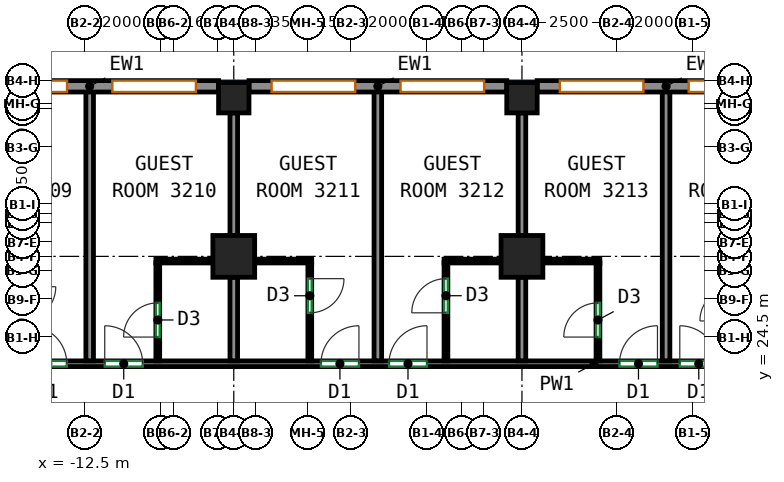
"""IFC4 building model, lengths in metres.
Left out: names, types, materials, properties, quantities, classifications, styles, units other than length and angle.
Written with IfcOpenShell. Run it as: python <this file> out.ifc"""

import sys

from ifc_helpers import new_model, si_unit, direction, frame, frame_2d, origin, origin_2d, place, context, subcontext, project, spatial, rectangle, extrude, source, transform, mapped, element, fill, save


model = new_model("IFC4")
c1 = context("Model", 3, precision=1e-05, world=origin(), true_north=direction((0.0, 1.0)))
c2 = subcontext(c1, "Body", "Model", "MODEL_VIEW")
j1 = project(units=[si_unit("LENGTHUNIT", "METRE"), si_unit("PLANEANGLEUNIT", "RADIAN")], contexts=[c1])
p1 = place(None, origin())
s1 = spatial("IfcSite", under=j1, at=p1, CompositionType="ELEMENT")
p2 = place(p1, origin())
s2 = spatial("IfcBuilding", under=s1, at=p2, CompositionType="ELEMENT")
p3 = place(p2, frame((0.0, 0.0, 143.9)))
s3 = spatial("IfcBuildingStorey", under=s2, at=p3, CompositionType="ELEMENT", Elevation=143.9)
m1 = source(origin(), c2, "Body", "SweptSolid", [
    extrude(rectangle(XDim=1.1, YDim=1.1, at=origin_2d()), origin(), (0.0, 0.0, 1.0), 3.12),
])
p4 = place(p3, frame((-8.583, 26.625, 0.0), z_axis=(0.0, 0.0, 1.0), x_axis=(1.0, 0.0, 0.0)))
e1 = element("IfcColumn", 1, at=p4, inside=s3, PredefinedType="COLUMN", context=c2, shape_type="MappedRepresentation", body=[
    mapped(m1, transform((0.0, 0.0, 0.0))),
])
m2 = source(origin(), c2, "Body", "SweptSolid", [
    extrude(rectangle(XDim=0.8, YDim=0.8, at=origin_2d()), origin(), (0.0, 0.0, 1.0), 3.12),
])
p5 = place(p3, frame((-8.583, 30.8, 0.0), z_axis=(0.0, 0.0, 1.0), x_axis=(1.0, 0.0, 0.0)))
e2 = element("IfcColumn", 2, at=p5, inside=s3, PredefinedType="COLUMN", context=c2, shape_type="MappedRepresentation", body=[
    mapped(m2, transform((0.0, 0.0, 0.0))),
])
p6 = place(p3, frame((-1.0, 26.625, 0.0), z_axis=(0.0, 0.0, 1.0), x_axis=(1.0, 0.0, 0.0)))
e3 = element("IfcColumn", 3, at=p6, inside=s3, PredefinedType="COLUMN", context=c2, shape_type="MappedRepresentation", body=[
    mapped(m1, transform((0.0, 0.0, 0.0))),
])
p7 = place(p3, frame((-1.0, 30.8, 0.0), z_axis=(0.0, 0.0, 1.0), x_axis=(1.0, 0.0, 0.0)))
e4 = element("IfcColumn", 4, at=p7, inside=s3, PredefinedType="COLUMN", context=c2, shape_type="MappedRepresentation", body=[
    mapped(m2, transform((0.0, 0.0, 0.0))),
])
m3 = source(origin(), c2, "Body", "SweptSolid", [
    extrude(rectangle(XDim=6.783, YDim=0.3, at=frame_2d((3.392, 0.0))), origin(), (0.0, 0.0, 1.0), 3.12),
])
p8 = place(p3, frame((6.183, 31.1, 0.0), z_axis=(0.0, 0.0, 1.0), x_axis=(-1.0, 0.0, 0.0)))
e5 = element("IfcWall", 5, at=p8, inside=s3, PredefinedType="SOLIDWALL", context=c2, shape_type="MappedRepresentation", body=[
    mapped(m3, transform((0.0, 0.0, 0.0))),
])
p9 = place(p8, frame((0.596, 0.0, 0.85)))
e6 = element("IfcOpeningElement", 6, at=p9, cuts=e5, PredefinedType="OPENING", context=c2, shape_type="SweptSolid", body=[
    extrude(rectangle(XDim=2.2, YDim=1.95, at=frame_2d((1.1, 0.975))), frame((0.0, 0.16, 0.0), z_axis=(0.0, -1.0, 0.0), x_axis=(1.0, 0.0, 0.0)), (0.0, 0.0, 1.0), 0.32),
])
p10 = place(p8, frame((3.988, 0.0, 0.85)))
e7 = element("IfcOpeningElement", 7, at=p10, cuts=e5, PredefinedType="OPENING", context=c2, shape_type="SweptSolid", body=[
    extrude(rectangle(XDim=2.2, YDim=1.95, at=frame_2d((1.1, 0.975))), frame((0.0, 0.16, 0.0), z_axis=(0.0, -1.0, 0.0), x_axis=(1.0, 0.0, 0.0)), (0.0, 0.0, 1.0), 0.32),
])
p11 = place(p3, frame((-1.4, 31.1, 0.0), z_axis=(0.0, 0.0, 1.0), x_axis=(-1.0, 0.0, 0.0)))
e8 = element("IfcWall", 8, at=p11, inside=s3, PredefinedType="SOLIDWALL", context=c2, shape_type="MappedRepresentation", body=[
    mapped(m3, transform((0.0, 0.0, 0.0))),
])
p12 = place(p11, frame((0.596, 0.0, 0.85)))
e9 = element("IfcOpeningElement", 9, at=p12, cuts=e8, PredefinedType="OPENING", context=c2, shape_type="SweptSolid", body=[
    extrude(rectangle(XDim=2.2, YDim=1.95, at=frame_2d((1.1, 0.975))), frame((0.0, 0.16, 0.0), z_axis=(0.0, -1.0, 0.0), x_axis=(1.0, 0.0, 0.0)), (0.0, 0.0, 1.0), 0.32),
])
p13 = place(p11, frame((3.988, 0.0, 0.85)))
e10 = element("IfcOpeningElement", 10, at=p13, cuts=e8, PredefinedType="OPENING", context=c2, shape_type="SweptSolid", body=[
    extrude(rectangle(XDim=2.2, YDim=1.95, at=frame_2d((1.1, 0.975))), frame((0.0, 0.16, 0.0), z_axis=(0.0, -1.0, 0.0), x_axis=(1.0, 0.0, 0.0)), (0.0, 0.0, 1.0), 0.32),
])
m4 = source(origin(), c2, "Body", "SweptSolid", [
    extrude(rectangle(XDim=6.783, YDim=0.3, at=frame_2d((3.392, 0.0))), origin(), (0.0, 0.0, 1.0), 3.12),
])
p14 = place(p3, frame((-8.983, 31.1, 0.0), z_axis=(0.0, 0.0, 1.0), x_axis=(-1.0, 0.0, 0.0)))
e11 = element("IfcWall", 11, at=p14, inside=s3, PredefinedType="SOLIDWALL", context=c2, shape_type="MappedRepresentation", body=[
    mapped(m4, transform((0.0, 0.0, 0.0))),
])
p15 = place(p14, frame((0.596, 0.0, 0.85)))
e12 = element("IfcOpeningElement", 12, at=p15, cuts=e11, PredefinedType="OPENING", context=c2, shape_type="SweptSolid", body=[
    extrude(rectangle(XDim=2.2, YDim=1.95, at=frame_2d((1.1, 0.975))), frame((0.0, 0.16, 0.0), z_axis=(0.0, -1.0, 0.0), x_axis=(1.0, 0.0, 0.0)), (0.0, 0.0, 1.0), 0.32),
])
p16 = place(p14, frame((3.988, 0.0, 0.85)))
e13 = element("IfcOpeningElement", 13, at=p16, cuts=e11, PredefinedType="OPENING", context=c2, shape_type="SweptSolid", body=[
    extrude(rectangle(XDim=2.2, YDim=1.95, at=frame_2d((1.1, 0.975))), frame((0.0, 0.16, 0.0), z_axis=(0.0, -1.0, 0.0), x_axis=(1.0, 0.0, 0.0)), (0.0, 0.0, 1.0), 0.32),
])
p17 = place(p3, frame((-20.059, 23.8, 0.0), z_axis=(0.0, 0.0, 1.0), x_axis=(1.0, 0.0, 0.0)))
e14 = element("IfcWall", 14, at=p17, inside=s3, PredefinedType="PARTITIONING", context=c2, shape_type="SweptSolid", body=[
    extrude(rectangle(XDim=41.909, YDim=0.15, at=frame_2d((20.955, 0.0))), origin(), (0.0, 0.0, 1.0), 3.12),
])
p18 = place(p17, frame((0.401, 0.0, 0.0)))
e15 = element("IfcOpeningElement", 15, at=p18, cuts=e14, PredefinedType="OPENING", context=c2, shape_type="SweptSolid", body=[
    extrude(rectangle(XDim=1.0, YDim=2.1, at=frame_2d((0.5, 1.05))), frame((0.0, 0.085, 0.0), z_axis=(0.0, -1.0, 0.0), x_axis=(1.0, 0.0, 0.0)), (0.0, 0.0, 1.0), 0.17),
])
p19 = place(p17, frame((6.082, 0.0, 0.0)))
e16 = element("IfcOpeningElement", 16, at=p19, cuts=e14, PredefinedType="OPENING", context=c2, shape_type="SweptSolid", body=[
    extrude(rectangle(XDim=1.0, YDim=2.1, at=frame_2d((0.5, 1.05))), frame((0.0, 0.085, 0.0), z_axis=(0.0, -1.0, 0.0), x_axis=(1.0, 0.0, 0.0)), (0.0, 0.0, 1.0), 0.17),
])
p20 = place(p17, frame((8.08, 0.0, 0.0)))
e17 = element("IfcOpeningElement", 17, at=p20, cuts=e14, PredefinedType="OPENING", context=c2, shape_type="SweptSolid", body=[
    extrude(rectangle(XDim=1.0, YDim=2.1, at=frame_2d((0.5, 1.05))), frame((0.0, 0.085, 0.0), z_axis=(0.0, -1.0, 0.0), x_axis=(1.0, 0.0, 0.0)), (0.0, 0.0, 1.0), 0.17),
])
p21 = place(p17, frame((13.769, 0.0, 0.0)))
e18 = element("IfcOpeningElement", 18, at=p21, cuts=e14, PredefinedType="OPENING", context=c2, shape_type="SweptSolid", body=[
    extrude(rectangle(XDim=1.0, YDim=2.1, at=frame_2d((0.5, 1.05))), frame((0.0, 0.085, 0.0), z_axis=(0.0, -1.0, 0.0), x_axis=(1.0, 0.0, 0.0)), (0.0, 0.0, 1.0), 0.17),
])
p22 = place(p17, frame((15.56, 0.0, 0.0)))
e19 = element("IfcOpeningElement", 19, at=p22, cuts=e14, PredefinedType="OPENING", context=c2, shape_type="SweptSolid", body=[
    extrude(rectangle(XDim=1.0, YDim=2.1, at=frame_2d((0.5, 1.05))), frame((0.0, 0.085, 0.0), z_axis=(0.0, -1.0, 0.0), x_axis=(1.0, 0.0, 0.0)), (0.0, 0.0, 1.0), 0.17),
])
p23 = place(p17, frame((21.625, 0.0, 0.0)))
e20 = element("IfcOpeningElement", 20, at=p23, cuts=e14, PredefinedType="OPENING", context=c2, shape_type="SweptSolid", body=[
    extrude(rectangle(XDim=1.0, YDim=2.1, at=frame_2d((0.5, 1.05))), frame((0.0, 0.085, 0.0), z_axis=(0.0, -1.0, 0.0), x_axis=(1.0, 0.0, 0.0)), (0.0, 0.0, 1.0), 0.17),
])
p24 = place(p17, frame((23.212, 0.0, 0.0)))
e21 = element("IfcOpeningElement", 21, at=p24, cuts=e14, PredefinedType="OPENING", context=c2, shape_type="SweptSolid", body=[
    extrude(rectangle(XDim=1.0, YDim=2.1, at=frame_2d((0.5, 1.05))), frame((0.0, 0.085, 0.0), z_axis=(0.0, -1.0, 0.0), x_axis=(1.0, 0.0, 0.0)), (0.0, 0.0, 1.0), 0.17),
])
p25 = place(p17, frame((29.038, 0.0, 0.0)))
e22 = element("IfcOpeningElement", 22, at=p25, cuts=e14, PredefinedType="OPENING", context=c2, shape_type="SweptSolid", body=[
    extrude(rectangle(XDim=1.0, YDim=2.1, at=frame_2d((0.5, 1.05))), frame((0.0, 0.085, 0.0), z_axis=(0.0, -1.0, 0.0), x_axis=(1.0, 0.0, 0.0)), (0.0, 0.0, 1.0), 0.17),
])
p26 = place(p17, frame((30.624, 0.0, 0.0)))
e23 = element("IfcOpeningElement", 23, at=p26, cuts=e14, PredefinedType="OPENING", context=c2, shape_type="SweptSolid", body=[
    extrude(rectangle(XDim=1.0, YDim=2.1, at=frame_2d((0.5, 1.05))), frame((0.0, 0.085, 0.0), z_axis=(0.0, -1.0, 0.0), x_axis=(1.0, 0.0, 0.0)), (0.0, 0.0, 1.0), 0.17),
])
p27 = place(p17, frame((36.622, 0.0, 0.0)))
e24 = element("IfcOpeningElement", 24, at=p27, cuts=e14, PredefinedType="OPENING", context=c2, shape_type="SweptSolid", body=[
    extrude(rectangle(XDim=1.0, YDim=2.1, at=frame_2d((0.5, 1.05))), frame((0.0, 0.085, 0.0), z_axis=(0.0, -1.0, 0.0), x_axis=(1.0, 0.0, 0.0)), (0.0, 0.0, 1.0), 0.17),
])
p28 = place(p17, frame((38.516, 0.0, 0.0)))
e25 = element("IfcOpeningElement", 25, at=p28, cuts=e14, PredefinedType="OPENING", context=c2, shape_type="SweptSolid", body=[
    extrude(rectangle(XDim=1.0, YDim=2.1, at=frame_2d((0.5, 1.05))), frame((0.0, 0.085, 0.0), z_axis=(0.0, -1.0, 0.0), x_axis=(1.0, 0.0, 0.0)), (0.0, 0.0, 1.0), 0.17),
])
p29 = place(p3, frame((-12.375, 23.877, 0.0), z_axis=(0.0, 0.0, 1.0), x_axis=(0.0, 1.0, 0.0)))
e26 = element("IfcWall", 26, at=p29, inside=s3, PredefinedType="PARTITIONING", context=c2, shape_type="SweptSolid", body=[
    extrude(rectangle(XDim=7.123, YDim=0.2, at=frame_2d((3.562, 0.0))), origin(), (0.0, 0.0, 1.0), 3.12),
])
p30 = place(p3, frame((-10.633, 26.502, 0.0), z_axis=(0.0, 0.0, 1.0), x_axis=(1.0, 0.0, 0.0)))
e27 = element("IfcWall", 27, at=p30, inside=s3, PredefinedType="PARTITIONING", context=c2, shape_type="SweptSolid", body=[
    extrude(rectangle(XDim=1.5, YDim=0.1, at=frame_2d((0.75, 0.0))), origin(), (0.0, 0.0, 1.0), 3.12),
])
p31 = place(p3, frame((-10.583, 23.877, 0.0), z_axis=(0.0, 0.0, 1.0), x_axis=(0.0, 1.0, 0.0)))
e28 = element("IfcWall", 28, at=p31, inside=s3, PredefinedType="PARTITIONING", context=c2, shape_type="SweptSolid", body=[
    extrude(rectangle(XDim=2.575, YDim=0.1, at=frame_2d((1.288, 0.0))), origin(), (0.0, 0.0, 1.0), 3.12),
])
p32 = place(p31, frame((0.625, 0.0, 0.0)))
e29 = element("IfcOpeningElement", 29, at=p32, cuts=e28, PredefinedType="OPENING", context=c2, shape_type="SweptSolid", body=[
    extrude(rectangle(XDim=0.9, YDim=2.1, at=frame_2d((0.45, 1.05))), frame((0.0, 0.06, 0.0), z_axis=(0.0, -1.0, 0.0), x_axis=(1.0, 0.0, 0.0)), (0.0, 0.0, 1.0), 0.12),
])
p33 = place(p3, frame((-8.583, 27.175, 0.0), z_axis=(0.0, 0.0, 1.0), x_axis=(0.0, 1.0, 0.0)))
e30 = element("IfcWall", 30, at=p33, inside=s3, PredefinedType="PARTITIONING", context=c2, shape_type="SweptSolid", body=[
    extrude(rectangle(XDim=3.225, YDim=0.2, at=frame_2d((1.612, 0.0))), origin(), (0.0, 0.0, 1.0), 3.12),
])
p34 = place(p3, frame((-8.583, 23.877, 0.0), z_axis=(0.0, 0.0, 1.0), x_axis=(0.0, 1.0, 0.0)))
e31 = element("IfcWall", 31, at=p34, inside=s3, PredefinedType="PARTITIONING", context=c2, shape_type="SweptSolid", body=[
    extrude(rectangle(XDim=2.198, YDim=0.2, at=frame_2d((1.099, 0.0))), origin(), (0.0, 0.0, 1.0), 3.12),
])
p35 = place(p3, frame((-8.033, 26.502, 0.0), z_axis=(0.0, 0.0, 1.0), x_axis=(1.0, 0.0, 0.0)))
e32 = element("IfcWall", 32, at=p35, inside=s3, PredefinedType="PARTITIONING", context=c2, shape_type="SweptSolid", body=[
    extrude(rectangle(XDim=1.5, YDim=0.1, at=frame_2d((0.75, 0.0))), origin(), (0.0, 0.0, 1.0), 3.12),
])
p36 = place(p3, frame((-6.583, 26.452, 0.0), z_axis=(0.0, 0.0, 1.0), x_axis=(0.0, -1.0, 0.0)))
e33 = element("IfcWall", 33, at=p36, inside=s3, PredefinedType="PARTITIONING", context=c2, shape_type="SweptSolid", body=[
    extrude(rectangle(XDim=2.575, YDim=0.1, at=frame_2d((1.288, 0.0))), origin(), (0.0, 0.0, 1.0), 3.12),
])
p37 = place(p36, frame((0.413, 0.0, 0.0)))
e34 = element("IfcOpeningElement", 34, at=p37, cuts=e33, PredefinedType="OPENING", context=c2, shape_type="SweptSolid", body=[
    extrude(rectangle(XDim=0.9, YDim=2.1, at=frame_2d((0.45, 1.05))), frame((0.0, 0.06, 0.0), z_axis=(0.0, -1.0, 0.0), x_axis=(1.0, 0.0, 0.0)), (0.0, 0.0, 1.0), 0.12),
])
p38 = place(p3, frame((-4.792, 23.877, 0.0), z_axis=(0.0, 0.0, 1.0), x_axis=(0.0, 1.0, 0.0)))
e35 = element("IfcWall", 35, at=p38, inside=s3, PredefinedType="PARTITIONING", context=c2, shape_type="SweptSolid", body=[
    extrude(rectangle(XDim=7.123, YDim=0.2, at=frame_2d((3.562, 0.0))), origin(), (0.0, 0.0, 1.0), 3.12),
])
p39 = place(p3, frame((-3.05, 26.502, 0.0), z_axis=(0.0, 0.0, 1.0), x_axis=(1.0, 0.0, 0.0)))
e36 = element("IfcWall", 36, at=p39, inside=s3, PredefinedType="PARTITIONING", context=c2, shape_type="SweptSolid", body=[
    extrude(rectangle(XDim=1.5, YDim=0.1, at=frame_2d((0.75, 0.0))), origin(), (0.0, 0.0, 1.0), 3.12),
])
p40 = place(p3, frame((-3.0, 23.877, 0.0), z_axis=(0.0, 0.0, 1.0), x_axis=(0.0, 1.0, 0.0)))
e37 = element("IfcWall", 37, at=p40, inside=s3, PredefinedType="PARTITIONING", context=c2, shape_type="SweptSolid", body=[
    extrude(rectangle(XDim=2.575, YDim=0.1, at=frame_2d((1.288, 0.0))), origin(), (0.0, 0.0, 1.0), 3.12),
])
p41 = place(p40, frame((1.263, 0.0, 0.0)))
e38 = element("IfcOpeningElement", 38, at=p41, cuts=e37, PredefinedType="OPENING", context=c2, shape_type="SweptSolid", body=[
    extrude(rectangle(XDim=0.9, YDim=2.1, at=frame_2d((0.45, 1.05))), frame((0.0, 0.06, 0.0), z_axis=(0.0, -1.0, 0.0), x_axis=(1.0, 0.0, 0.0)), (0.0, 0.0, 1.0), 0.12),
])
p42 = place(p3, frame((-1.0, 27.175, 0.0), z_axis=(0.0, 0.0, 1.0), x_axis=(0.0, 1.0, 0.0)))
e39 = element("IfcWall", 39, at=p42, inside=s3, PredefinedType="PARTITIONING", context=c2, shape_type="SweptSolid", body=[
    extrude(rectangle(XDim=3.225, YDim=0.2, at=frame_2d((1.612, 0.0))), origin(), (0.0, 0.0, 1.0), 3.12),
])
p43 = place(p3, frame((-1.0, 23.877, 0.0), z_axis=(0.0, 0.0, 1.0), x_axis=(0.0, 1.0, 0.0)))
e40 = element("IfcWall", 40, at=p43, inside=s3, PredefinedType="PARTITIONING", context=c2, shape_type="SweptSolid", body=[
    extrude(rectangle(XDim=2.198, YDim=0.2, at=frame_2d((1.099, 0.0))), origin(), (0.0, 0.0, 1.0), 3.12),
])
p44 = place(p3, frame((-0.45, 26.502, 0.0), z_axis=(0.0, 0.0, 1.0), x_axis=(1.0, 0.0, 0.0)))
e41 = element("IfcWall", 41, at=p44, inside=s3, PredefinedType="PARTITIONING", context=c2, shape_type="SweptSolid", body=[
    extrude(rectangle(XDim=1.5, YDim=0.1, at=frame_2d((0.75, 0.0))), origin(), (0.0, 0.0, 1.0), 3.12),
])
p45 = place(p3, frame((1.0, 23.877, 0.0), z_axis=(0.0, 0.0, 1.0), x_axis=(0.0, 1.0, 0.0)))
e42 = element("IfcWall", 42, at=p45, inside=s3, PredefinedType="PARTITIONING", context=c2, shape_type="SweptSolid", body=[
    extrude(rectangle(XDim=2.575, YDim=0.1, at=frame_2d((1.288, 0.0))), origin(), (0.0, 0.0, 1.0), 3.12),
])
p46 = place(p45, frame((0.625, 0.0, 0.0)))
e43 = element("IfcOpeningElement", 43, at=p46, cuts=e42, PredefinedType="OPENING", context=c2, shape_type="SweptSolid", body=[
    extrude(rectangle(XDim=0.9, YDim=2.1, at=frame_2d((0.45, 1.05))), frame((0.0, 0.06, 0.0), z_axis=(0.0, -1.0, 0.0), x_axis=(1.0, 0.0, 0.0)), (0.0, 0.0, 1.0), 0.12),
])
p47 = place(p3, frame((2.792, 23.877, 0.0), z_axis=(0.0, 0.0, 1.0), x_axis=(0.0, 1.0, 0.0)))
e44 = element("IfcWall", 44, at=p47, inside=s3, PredefinedType="PARTITIONING", context=c2, shape_type="SweptSolid", body=[
    extrude(rectangle(XDim=7.123, YDim=0.2, at=frame_2d((3.562, 0.0))), origin(), (0.0, 0.0, 1.0), 3.12),
])
p48 = place(p9, origin())
e45 = element("IfcWindow", 45, at=p48, inside=s3, PartitioningType="SINGLE_PANEL", PredefinedType="WINDOW", context=c2, shape_type="SweptSolid", body=[
    extrude(rectangle(XDim=2.2, YDim=1.95, at=frame_2d((1.1, 0.975))), frame((0.0, 0.03, 0.0), z_axis=(0.0, -1.0, 0.0), x_axis=(1.0, 0.0, 0.0)), (0.0, 0.0, 1.0), 0.06),
])
fill(e6, e45)
p49 = place(p10, origin())
e46 = element("IfcWindow", 46, at=p49, inside=s3, PartitioningType="SINGLE_PANEL", PredefinedType="WINDOW", context=c2, shape_type="SweptSolid", body=[
    extrude(rectangle(XDim=2.2, YDim=1.95, at=frame_2d((1.1, 0.975))), frame((0.0, 0.03, 0.0), z_axis=(0.0, -1.0, 0.0), x_axis=(1.0, 0.0, 0.0)), (0.0, 0.0, 1.0), 0.06),
])
fill(e7, e46)
p50 = place(p12, origin())
e47 = element("IfcWindow", 47, at=p50, inside=s3, PartitioningType="SINGLE_PANEL", PredefinedType="WINDOW", context=c2, shape_type="SweptSolid", body=[
    extrude(rectangle(XDim=2.2, YDim=1.95, at=frame_2d((1.1, 0.975))), frame((0.0, 0.03, 0.0), z_axis=(0.0, -1.0, 0.0), x_axis=(1.0, 0.0, 0.0)), (0.0, 0.0, 1.0), 0.06),
])
fill(e9, e47)
p51 = place(p13, origin())
e48 = element("IfcWindow", 48, at=p51, inside=s3, PartitioningType="SINGLE_PANEL", PredefinedType="WINDOW", context=c2, shape_type="SweptSolid", body=[
    extrude(rectangle(XDim=2.2, YDim=1.95, at=frame_2d((1.1, 0.975))), frame((0.0, 0.03, 0.0), z_axis=(0.0, -1.0, 0.0), x_axis=(1.0, 0.0, 0.0)), (0.0, 0.0, 1.0), 0.06),
])
fill(e10, e48)
p52 = place(p15, origin())
e49 = element("IfcWindow", 49, at=p52, inside=s3, PartitioningType="SINGLE_PANEL", PredefinedType="WINDOW", context=c2, shape_type="SweptSolid", body=[
    extrude(rectangle(XDim=2.2, YDim=1.95, at=frame_2d((1.1, 0.975))), frame((0.0, 0.03, 0.0), z_axis=(0.0, -1.0, 0.0), x_axis=(1.0, 0.0, 0.0)), (0.0, 0.0, 1.0), 0.06),
])
fill(e12, e49)
p53 = place(p16, origin())
e50 = element("IfcWindow", 50, at=p53, inside=s3, PartitioningType="SINGLE_PANEL", PredefinedType="WINDOW", context=c2, shape_type="SweptSolid", body=[
    extrude(rectangle(XDim=2.2, YDim=1.95, at=frame_2d((1.1, 0.975))), frame((0.0, 0.03, 0.0), z_axis=(0.0, -1.0, 0.0), x_axis=(1.0, 0.0, 0.0)), (0.0, 0.0, 1.0), 0.06),
])
fill(e13, e50)
p54 = place(p19, origin())
e51 = element("IfcDoor", 51, at=p54, inside=s3, OperationType="SINGLE_SWING_LEFT", PredefinedType="DOOR", context=c2, shape_type="SweptSolid", body=[
    extrude(rectangle(XDim=1.0, YDim=2.1, at=frame_2d((0.5, 1.05))), frame((0.0, 0.025, 0.0), z_axis=(0.0, -1.0, 0.0), x_axis=(1.0, 0.0, 0.0)), (0.0, 0.0, 1.0), 0.05),
])
fill(e16, e51)
p55 = place(p20, origin())
e52 = element("IfcDoor", 52, at=p55, inside=s3, OperationType="SINGLE_SWING_LEFT", PredefinedType="DOOR", context=c2, shape_type="SweptSolid", body=[
    extrude(rectangle(XDim=1.0, YDim=2.1, at=frame_2d((0.5, 1.05))), frame((0.0, 0.025, 0.0), z_axis=(0.0, -1.0, 0.0), x_axis=(1.0, 0.0, 0.0)), (0.0, 0.0, 1.0), 0.05),
])
fill(e17, e52)
p56 = place(p21, origin())
e53 = element("IfcDoor", 53, at=p56, inside=s3, OperationType="SINGLE_SWING_RIGHT", PredefinedType="DOOR", context=c2, shape_type="SweptSolid", body=[
    extrude(rectangle(XDim=1.0, YDim=2.1, at=frame_2d((0.5, 1.05))), frame((0.0, 0.025, 0.0), z_axis=(0.0, -1.0, 0.0), x_axis=(1.0, 0.0, 0.0)), (0.0, 0.0, 1.0), 0.05),
])
fill(e18, e53)
p57 = place(p22, origin())
e54 = element("IfcDoor", 54, at=p57, inside=s3, OperationType="SINGLE_SWING_RIGHT", PredefinedType="DOOR", context=c2, shape_type="SweptSolid", body=[
    extrude(rectangle(XDim=1.0, YDim=2.1, at=frame_2d((0.5, 1.05))), frame((0.0, 0.025, 0.0), z_axis=(0.0, -1.0, 0.0), x_axis=(1.0, 0.0, 0.0)), (0.0, 0.0, 1.0), 0.05),
])
fill(e19, e54)
p58 = place(p23, origin())
e55 = element("IfcDoor", 55, at=p58, inside=s3, OperationType="SINGLE_SWING_RIGHT", PredefinedType="DOOR", context=c2, shape_type="SweptSolid", body=[
    extrude(rectangle(XDim=1.0, YDim=2.1, at=frame_2d((0.5, 1.05))), frame((0.0, 0.025, 0.0), z_axis=(0.0, -1.0, 0.0), x_axis=(1.0, 0.0, 0.0)), (0.0, 0.0, 1.0), 0.05),
])
fill(e20, e55)
p59 = place(p24, origin())
e56 = element("IfcDoor", 56, at=p59, inside=s3, OperationType="SINGLE_SWING_LEFT", PredefinedType="DOOR", context=c2, shape_type="SweptSolid", body=[
    extrude(rectangle(XDim=1.0, YDim=2.1, at=frame_2d((0.5, 1.05))), frame((0.0, 0.025, 0.0), z_axis=(0.0, -1.0, 0.0), x_axis=(1.0, 0.0, 0.0)), (0.0, 0.0, 1.0), 0.05),
])
fill(e21, e56)
p60 = place(p32, origin())
e57 = element("IfcDoor", 57, at=p60, inside=s3, OperationType="SINGLE_SWING_LEFT", PredefinedType="DOOR", context=c2, shape_type="SweptSolid", body=[
    extrude(rectangle(XDim=0.9, YDim=2.1, at=frame_2d((0.45, 1.05))), frame((0.0, 0.025, 0.0), z_axis=(0.0, -1.0, 0.0), x_axis=(1.0, 0.0, 0.0)), (0.0, 0.0, 1.0), 0.05),
])
fill(e29, e57)
p61 = place(p46, origin())
e58 = element("IfcDoor", 58, at=p61, inside=s3, OperationType="SINGLE_SWING_LEFT", PredefinedType="DOOR", context=c2, shape_type="SweptSolid", body=[
    extrude(rectangle(XDim=0.9, YDim=2.1, at=frame_2d((0.45, 1.05))), frame((0.0, 0.025, 0.0), z_axis=(0.0, -1.0, 0.0), x_axis=(1.0, 0.0, 0.0)), (0.0, 0.0, 1.0), 0.05),
])
fill(e43, e58)
p62 = place(p37, origin())
e59 = element("IfcDoor", 59, at=p62, inside=s3, OperationType="SINGLE_SWING_LEFT", PredefinedType="DOOR", context=c2, shape_type="SweptSolid", body=[
    extrude(rectangle(XDim=0.9, YDim=2.1, at=frame_2d((0.45, 1.05))), frame((0.0, 0.025, 0.0), z_axis=(0.0, -1.0, 0.0), x_axis=(1.0, 0.0, 0.0)), (0.0, 0.0, 1.0), 0.05),
])
fill(e34, e59)
p63 = place(p41, origin())
e60 = element("IfcDoor", 60, at=p63, inside=s3, OperationType="SINGLE_SWING_LEFT", PredefinedType="DOOR", context=c2, shape_type="SweptSolid", body=[
    extrude(rectangle(XDim=0.9, YDim=2.1, at=frame_2d((0.45, 1.05))), frame((0.0, 0.025, 0.0), z_axis=(0.0, -1.0, 0.0), x_axis=(1.0, 0.0, 0.0)), (0.0, 0.0, 1.0), 0.05),
])
fill(e38, e60)
save(model, sys.argv[1])
